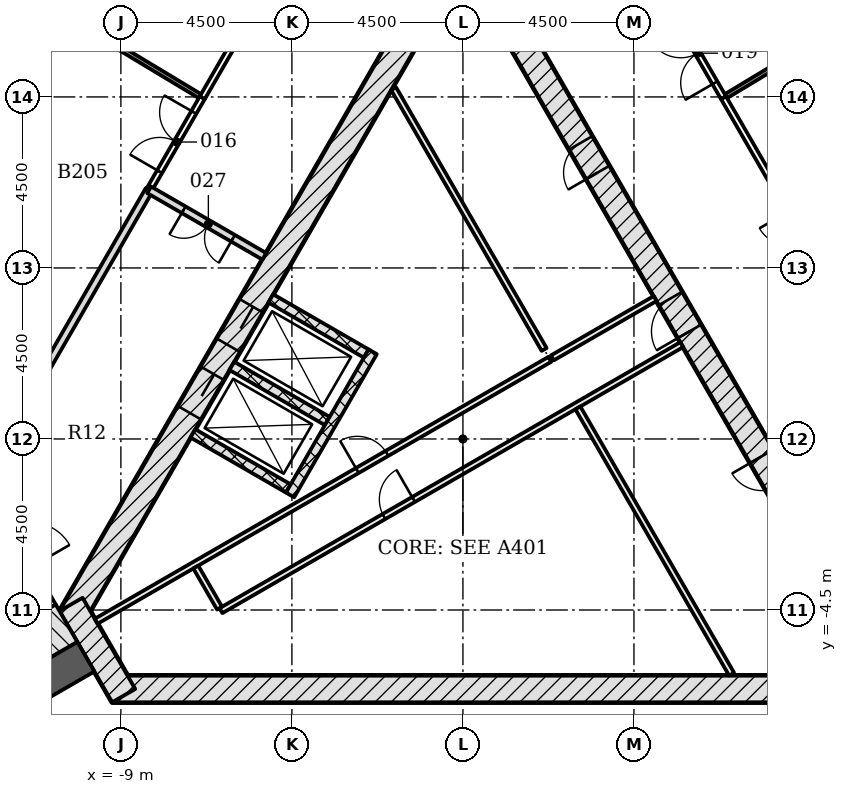
"""IFC4 building model, lengths in metres.
Left out: names, types, materials, properties, quantities, classifications, styles, units other than length and angle.
Written with IfcOpenShell. Run it as: python <this file> out.ifc"""

import sys

from ifc_helpers import new_model, si_unit, direction, frame, frame_2d, origin, place, context, subcontext, project, spatial, rectangle, extrude, element, fill, save


model = new_model("IFC4")
c1 = context("Model", 3, precision=1e-05, world=origin(), true_north=direction((0.0, 1.0)))
c2 = subcontext(c1, "Body", "Model", "MODEL_VIEW")
j1 = project(units=[si_unit("LENGTHUNIT", "METRE"), si_unit("PLANEANGLEUNIT", "RADIAN")], contexts=[c1])
p1 = place(None, origin())
s1 = spatial("IfcSite", under=j1, at=p1, CompositionType="ELEMENT")
p2 = place(p1, origin())
s2 = spatial("IfcBuilding", under=s1, at=p2, CompositionType="ELEMENT")
p3 = place(p2, frame((0.0, 0.0, -9.0)))
s3 = spatial("IfcBuildingStorey", under=s2, at=p3, CompositionType="ELEMENT", Elevation=-9.0)
p4 = place(p3, frame((-9.229, -6.578, -0.3), z_axis=(0.0, 0.0, 1.0), x_axis=(1.0, 0.0, 0.0)))
e1 = element("IfcWall", 1, at=p4, inside=s3, PredefinedType="SHEAR", context=c2, shape_type="SweptSolid", body=[
    extrude(rectangle(XDim=18.458, YDim=0.7, at=frame_2d((9.229, 0.0))), origin(), (0.0, 0.0, 1.0), 4.5),
])
p5 = place(p3, frame((10.311, -4.703, -0.3), z_axis=(0.0, 0.0, 1.0), x_axis=(-0.500001446645, 0.866024568562, 0.0)))
e2 = element("IfcWall", 2, at=p5, inside=s3, PredefinedType="SHEAR", context=c2, shape_type="SweptSolid", body=[
    extrude(rectangle(XDim=18.458, YDim=0.7, at=frame_2d((9.229, 0.0))), origin(), (0.0, 0.0, 1.0), 4.5),
])
p6 = place(p5, frame((8.7, 0.0, 0.3)))
e3 = element("IfcOpeningElement", 3, at=p6, cuts=e2, PredefinedType="OPENING", context=c2, shape_type="SweptSolid", body=[
    extrude(rectangle(XDim=1.0, YDim=2.1, at=frame_2d((0.5, 1.05))), frame((0.0, 0.36, 0.0), z_axis=(0.0, -1.0, 0.0), x_axis=(1.0, 0.0, 0.0)), (0.0, 0.0, 1.0), 0.72),
])
p7 = place(p5, frame((4.002, 0.0, 0.3)))
e4 = element("IfcOpeningElement", 4, at=p7, cuts=e2, PredefinedType="OPENING", context=c2, shape_type="SweptSolid", body=[
    extrude(rectangle(XDim=0.9, YDim=2.1, at=frame_2d((0.45, 1.05))), frame((0.0, 0.36, 0.0), z_axis=(0.0, -1.0, 0.0), x_axis=(1.0, 0.0, 0.0)), (0.0, 0.0, 1.0), 0.72),
])
p8 = place(p5, frame((13.527, 0.0, 0.3)))
e5 = element("IfcOpeningElement", 5, at=p8, cuts=e2, PredefinedType="OPENING", context=c2, shape_type="SweptSolid", body=[
    extrude(rectangle(XDim=0.9, YDim=2.1, at=frame_2d((0.45, 1.05))), frame((0.0, 0.36, 0.0), z_axis=(0.0, -1.0, 0.0), x_axis=(1.0, 0.0, 0.0)), (0.0, 0.0, 1.0), 0.72),
])
p9 = place(p3, frame((-1.083, 11.281, -0.3), z_axis=(0.0, 0.0, 1.0), x_axis=(-0.500001446645, -0.866024568562, 0.0)))
e6 = element("IfcWall", 6, at=p9, inside=s3, PredefinedType="SHEAR", context=c2, shape_type="SweptSolid", body=[
    extrude(rectangle(XDim=18.458, YDim=0.7, at=frame_2d((9.229, 0.0))), origin(), (0.0, 0.0, 1.0), 4.5),
])
p10 = place(p9, frame((8.979, 0.0, 0.3)))
e7 = element("IfcOpeningElement", 7, at=p10, cuts=e6, PredefinedType="OPENING", context=c2, shape_type="SweptSolid", body=[
    extrude(rectangle(XDim=1.2, YDim=2.1, at=frame_2d((0.6, 1.05))), frame((0.0, 0.36, 0.0), z_axis=(0.0, -1.0, 0.0), x_axis=(1.0, 0.0, 0.0)), (0.0, 0.0, 1.0), 0.72),
])
p11 = place(p9, frame((11.029, 0.0, 0.3)))
e8 = element("IfcOpeningElement", 8, at=p11, cuts=e6, PredefinedType="OPENING", context=c2, shape_type="SweptSolid", body=[
    extrude(rectangle(XDim=1.2, YDim=2.1, at=frame_2d((0.6, 1.05))), frame((0.0, 0.36, 0.0), z_axis=(0.0, -1.0, 0.0), x_axis=(1.0, 0.0, 0.0)), (0.0, 0.0, 1.0), 0.72),
])
p12 = place(p3, frame((-10.311, -4.353, -0.3), z_axis=(0.0, 0.0, 1.0), x_axis=(0.500042739161, -0.866000726912, 0.0)))
e9 = element("IfcWall", 9, at=p12, inside=s3, PredefinedType="SHEAR", context=c2, shape_type="SweptSolid", body=[
    extrude(rectangle(XDim=2.771, YDim=0.7, at=frame_2d((1.386, 0.0))), origin(), (0.0, 0.0, 1.0), 4.5),
])
p13 = place(p3, frame((-9.922, -5.728, -0.3), z_axis=(0.0, 0.0, 1.0), x_axis=(-0.866028046028, -0.499995423472, 0.0)))
e10 = element("IfcWall", 10, at=p13, inside=s3, PredefinedType="SHEAR", context=c2, shape_type="SweptSolid", body=[
    extrude(rectangle(XDim=14.633, YDim=0.9, at=frame_2d((7.316, 0.0))), origin(), (0.0, 0.0, 1.0), 4.5),
])
p14 = place(p13, frame((7.35, 0.0, 0.3)))
e11 = element("IfcOpeningElement", 11, at=p14, cuts=e10, PredefinedType="OPENING", context=c2, shape_type="SweptSolid", body=[
    extrude(rectangle(XDim=1.5, YDim=2.1, at=frame_2d((0.75, 1.05))), frame((0.0, 0.46, 0.0), z_axis=(0.0, -1.0, 0.0), x_axis=(1.0, 0.0, 0.0)), (0.0, 0.0, 1.0), 0.92),
])
for number, where, z_axis, x_axis in (
    (12, (-5.056, 3.699, 0.0), (0.0, 0.0, 1.0), (0.866, -0.5, 0.0)),
    (13, (-6.081, 1.923, 0.0), (0.0, 0.0, 1.0), (0.866, -0.5, 0.0)),
    (14, (-7.106, 0.148, 0.0), (0.0, 0.0, 1.0), (0.866, -0.5, 0.0)),
):
    element("IfcWall", number, at=place(p3, frame(where, z_axis=z_axis, x_axis=x_axis)), inside=s3, PredefinedType="PARTITIONING", context=c2, shape_type="SweptSolid", body=[
        extrude(rectangle(XDim=2.9, YDim=0.25, at=frame_2d((1.45, 0.0))), origin(), (0.0, 0.0, 1.0), 4.2),
    ])
p15 = place(p3, frame((-2.374, 2.294, 0.0), z_axis=(0.0, 0.0, 1.0), x_axis=(-0.499996127374, -0.866027639635, 0.0)))
e15 = element("IfcWall", 15, at=p15, inside=s3, PredefinedType="PARTITIONING", context=c2, shape_type="SweptSolid", body=[
    extrude(rectangle(XDim=4.35, YDim=0.25, at=frame_2d((2.175, 0.0))), origin(), (0.0, 0.0, 1.0), 4.2),
])
p16 = place(p3, frame((-9.651, -4.797, 0.0), z_axis=(0.0, 0.0, 1.0), x_axis=(0.866023073213, 0.500004036646, 0.0)))
e16 = element("IfcWall", 16, at=p16, inside=s3, PredefinedType="PARTITIONING", context=c2, shape_type="SweptSolid", body=[
    extrude(rectangle(XDim=13.785, YDim=0.15, at=frame_2d((6.892, 0.0))), origin(), (0.0, 0.0, 1.0), 4.2),
])
p17 = place(p16, frame((7.934, 0.0, 0.0)))
e17 = element("IfcOpeningElement", 17, at=p17, cuts=e16, PredefinedType="OPENING", context=c2, shape_type="SweptSolid", body=[
    extrude(rectangle(XDim=0.9, YDim=2.1, at=frame_2d((0.45, 1.05))), frame((0.0, 0.085, 0.0), z_axis=(0.0, -1.0, 0.0), x_axis=(1.0, 0.0, 0.0)), (0.0, 0.0, 1.0), 0.17),
])
p18 = place(p3, frame((-6.366, -4.517, 0.0), z_axis=(0.0, 0.0, 1.0), x_axis=(0.866023831006, 0.500002724122, 0.0)))
e18 = element("IfcWall", 18, at=p18, inside=s3, PredefinedType="PARTITIONING", context=c2, shape_type="SweptSolid", body=[
    extrude(rectangle(XDim=14.0, YDim=0.15, at=frame_2d((7.0, 0.0))), origin(), (0.0, 0.0, 1.0), 4.2),
])
p19 = place(p18, frame((4.951, 0.0, 0.0)))
e19 = element("IfcOpeningElement", 19, at=p19, cuts=e18, PredefinedType="OPENING", context=c2, shape_type="SweptSolid", body=[
    extrude(rectangle(XDim=0.9, YDim=2.1, at=frame_2d((0.45, 1.05))), frame((0.0, 0.085, 0.0), z_axis=(0.0, -1.0, 0.0), x_axis=(1.0, 0.0, 0.0)), (0.0, 0.0, 1.0), 0.17),
])
p20 = place(p3, frame((-6.404, -4.452, 0.0), z_axis=(0.0, 0.0, 1.0), x_axis=(-0.500004234368, 0.866022959057, 0.0)))
e20 = element("IfcWall", 20, at=p20, inside=s3, PredefinedType="PARTITIONING", context=c2, shape_type="SweptSolid", body=[
    extrude(rectangle(XDim=1.25, YDim=0.15, at=frame_2d((0.625, 0.0))), origin(), (0.0, 0.0, 1.0), 4.2),
])
p21 = place(p3, frame((2.137, 2.355, 0.0), z_axis=(0.0, 0.0, 1.0), x_axis=(-0.500009612796, 0.866019853763, 0.0)))
e21 = element("IfcWall", 21, at=p21, inside=s3, PredefinedType="PARTITIONING", context=c2, shape_type="SweptSolid", body=[
    extrude(rectangle(XDim=7.924, YDim=0.15, at=frame_2d((3.962, 0.0))), origin(), (0.0, 0.0, 1.0), 4.2),
])
p22 = place(p3, frame((2.352, 2.133, 0.0), z_axis=(0.0, 0.0, 1.0), x_axis=(0.866042488821, 0.49997040668, 0.0)))
e22 = element("IfcWall", 22, at=p22, inside=s3, PredefinedType="PARTITIONING", context=c2, shape_type="SweptSolid", body=[
    extrude(rectangle(XDim=3.125, YDim=0.15, at=frame_2d((1.562, 0.0))), origin(), (0.0, 0.0, 1.0), 4.2),
])
p23 = place(p3, frame((7.07, -6.189, 0.0), z_axis=(0.0, 0.0, 1.0), x_axis=(-0.499997568964, 0.866026807339, 0.0)))
e23 = element("IfcWall", 23, at=p23, inside=s3, PredefinedType="PARTITIONING", context=c2, shape_type="SweptSolid", body=[
    extrude(rectangle(XDim=8.091, YDim=0.15, at=frame_2d((4.046, 0.0))), origin(), (0.0, 0.0, 1.0), 4.2),
])
p24 = place(p3, frame((-12.576, -1.331, -0.3), z_axis=(0.0, 0.0, 1.0), x_axis=(0.499970499736, -0.8660424351, 0.0)))
e24 = element("IfcWall", 24, at=p24, inside=s3, PredefinedType="SHEAR", context=c2, shape_type="SweptSolid", body=[
    extrude(rectangle(XDim=3.55, YDim=0.2, at=frame_2d((1.775, 0.0))), origin(), (0.0, 0.0, 1.0), 4.5),
])
p25 = place(p24, frame((1.175, 0.0, 0.3)))
e25 = element("IfcOpeningElement", 25, at=p25, cuts=e24, PredefinedType="OPENING", context=c2, shape_type="SweptSolid", body=[
    extrude(rectangle(XDim=1.2, YDim=2.1, at=frame_2d((0.6, 1.05))), frame((0.0, 0.11, 0.0), z_axis=(0.0, -1.0, 0.0), x_axis=(1.0, 0.0, 0.0)), (0.0, 0.0, 1.0), 0.22),
])
p26 = place(p3, frame((-10.43, -4.847, -0.3), z_axis=(0.0, 0.0, 1.0), x_axis=(-0.866018442252, -0.500012057535, 0.0)))
e26 = element("IfcWall", 26, at=p26, inside=s3, PredefinedType="SHEAR", context=c2, shape_type="SweptSolid", body=[
    extrude(rectangle(XDim=7.2, YDim=1.136, at=frame_2d((3.6, 0.0))), origin(), (0.0, 0.0, 1.0), 4.5),
])
p27 = place(p3, frame((7.44, -10.226, -0.3), z_axis=(0.0, 0.0, 1.0), x_axis=(0.500022077904, 0.866012656725, 0.0)))
e27 = element("IfcWall", 27, at=p27, inside=s3, PredefinedType="SHEAR", context=c2, shape_type="SweptSolid", body=[
    extrude(rectangle(XDim=3.55, YDim=0.2, at=frame_2d((1.775, 0.0))), origin(), (0.0, 0.0, 1.0), 4.5),
])
p28 = place(p27, frame((1.175, 0.0, 0.3)))
e28 = element("IfcOpeningElement", 28, at=p28, cuts=e27, PredefinedType="OPENING", context=c2, shape_type="SweptSolid", body=[
    extrude(rectangle(XDim=1.2, YDim=2.1, at=frame_2d((0.6, 1.05))), frame((0.0, 0.11, 0.0), z_axis=(0.0, -1.0, 0.0), x_axis=(1.0, 0.0, 0.0)), (0.0, 0.0, 1.0), 0.22),
])
p29 = place(p3, frame((-8.256, 6.555, 0.0), z_axis=(0.0, 0.0, 1.0), x_axis=(-0.500042467634, -0.866000883696, 0.0)))
e29 = element("IfcWall", 29, at=p29, inside=s3, PredefinedType="PARTITIONING", context=c2, shape_type="SweptSolid", body=[
    extrude(rectangle(XDim=5.899, YDim=0.2, at=frame_2d((2.95, 0.0))), origin(), (0.0, 0.0, 1.0), 3.588),
])
p30 = place(p3, frame((-5.226, 4.806, 0.0), z_axis=(0.0, 0.0, 1.0), x_axis=(-0.865949687125, 0.500131122175, 0.0)))
e30 = element("IfcWall", 30, at=p30, inside=s3, PredefinedType="PARTITIONING", context=c2, shape_type="SweptSolid", body=[
    extrude(rectangle(XDim=3.499, YDim=0.2, at=frame_2d((1.75, 0.0))), origin(), (0.0, 0.0, 1.0), 4.2),
])
p31 = place(p30, frame((0.95, 0.0, 0.0)))
e31 = element("IfcOpeningElement", 31, at=p31, cuts=e30, PredefinedType="OPENING", context=c2, shape_type="SweptSolid", body=[
    extrude(rectangle(XDim=1.5, YDim=2.1, at=frame_2d((0.75, 1.05))), frame((0.0, 0.11, 0.0), z_axis=(0.0, -1.0, 0.0), x_axis=(1.0, 0.0, 0.0)), (0.0, 0.0, 1.0), 0.22),
])
p32 = place(p3, frame((11.206, 1.446, 0.0), z_axis=(0.0, 0.0, 1.0), x_axis=(-0.499983976786, 0.866034654594, 0.0)))
e32 = element("IfcWall", 32, at=p32, inside=s3, PredefinedType="PARTITIONING", context=c2, shape_type="SweptSolid", body=[
    extrude(rectangle(XDim=8.7, YDim=0.15, at=frame_2d((4.35, 0.0))), origin(), (0.0, 0.0, 1.0), 3.588),
])
p33 = place(p32, frame((3.45, 0.0, 0.0)))
e33 = element("IfcOpeningElement", 33, at=p33, cuts=e32, PredefinedType="OPENING", context=c2, shape_type="SweptSolid", body=[
    extrude(rectangle(XDim=1.8, YDim=2.1, at=frame_2d((0.9, 1.05))), frame((0.0, 0.085, 0.0), z_axis=(0.0, -1.0, 0.0), x_axis=(1.0, 0.0, 0.0)), (0.0, 0.0, 1.0), 0.17),
])
p34 = place(p3, frame((6.855, 8.982, 0.0), z_axis=(0.0, 0.0, 1.0), x_axis=(-0.500176439337, 0.865923512519, 0.0)))
e34 = element("IfcWall", 34, at=p34, inside=s3, PredefinedType="PARTITIONING", context=c2, shape_type="SweptSolid", body=[
    extrude(rectangle(XDim=2.855, YDim=0.15, at=frame_2d((1.427, 0.0))), origin(), (0.0, 0.0, 1.0), 3.588),
])
p35 = place(p34, frame((0.45, 0.0, 0.0)))
e35 = element("IfcOpeningElement", 35, at=p35, cuts=e34, PredefinedType="OPENING", context=c2, shape_type="SweptSolid", body=[
    extrude(rectangle(XDim=1.8, YDim=2.1, at=frame_2d((0.9, 1.05))), frame((0.0, 0.085, 0.0), z_axis=(0.0, -1.0, 0.0), x_axis=(1.0, 0.0, 0.0)), (0.0, 0.0, 1.0), 0.17),
])
p36 = place(p3, frame((-6.857, 8.983, 0.0), z_axis=(0.0, 0.0, 1.0), x_axis=(-0.85673770383, 0.515752369685, 0.0)))
e36 = element("IfcWall", 36, at=p36, inside=s3, PredefinedType="PARTITIONING", context=c2, shape_type="SweptSolid", body=[
    extrude(rectangle(XDim=3.798, YDim=0.12, at=frame_2d((1.899, 0.0))), origin(), (0.0, 0.0, 1.0), 3.588),
])
p37 = place(p3, frame((-8.256, 6.558, 0.0), z_axis=(0.0, 0.0, 1.0), x_axis=(0.500081734942, 0.86597820895, 0.0)))
e37 = element("IfcWall", 37, at=p37, inside=s3, PredefinedType="PARTITIONING", context=c2, shape_type="SweptSolid", body=[
    extrude(rectangle(XDim=2.804, YDim=0.15, at=frame_2d((1.402, 0.0))), origin(), (0.0, 0.0, 1.0), 3.588),
])
p38 = place(p37, frame((0.55, 0.0, 0.0)))
e38 = element("IfcOpeningElement", 38, at=p38, cuts=e37, PredefinedType="OPENING", context=c2, shape_type="SweptSolid", body=[
    extrude(rectangle(XDim=1.8, YDim=2.1, at=frame_2d((0.9, 1.05))), frame((0.0, 0.085, 0.0), z_axis=(0.0, -1.0, 0.0), x_axis=(1.0, 0.0, 0.0)), (0.0, 0.0, 1.0), 0.17),
])
p39 = place(p3, frame((12.736, 12.524, 0.0), z_axis=(0.0, 0.0, 1.0), x_axis=(-0.856559377083, -0.516048479827, 0.0)))
e39 = element("IfcWall", 39, at=p39, inside=s3, PredefinedType="PARTITIONING", context=c2, shape_type="SweptSolid", body=[
    extrude(rectangle(XDim=6.864, YDim=0.12, at=frame_2d((3.432, 0.0))), origin(), (0.0, 0.0, 1.0), 3.588),
])
p40 = place(p3, frame((-6.858, 8.979, 0.0), z_axis=(0.0, 0.0, 1.0), x_axis=(0.500105111742, 0.865964708986, 0.0)))
e40 = element("IfcWall", 40, at=p40, inside=s3, PredefinedType="PARTITIONING", context=c2, shape_type="SweptSolid", body=[
    extrude(rectangle(XDim=4.363, YDim=0.15, at=frame_2d((2.181, 0.0))), origin(), (0.0, 0.0, 1.0), 3.588),
])
p41 = place(p40, frame((1.65, 0.0, 0.0)))
e41 = element("IfcOpeningElement", 41, at=p41, cuts=e40, PredefinedType="OPENING", context=c2, shape_type="SweptSolid", body=[
    extrude(rectangle(XDim=1.0, YDim=2.1, at=frame_2d((0.5, 1.05))), frame((0.0, 0.085, 0.0), z_axis=(0.0, -1.0, 0.0), x_axis=(1.0, 0.0, 0.0)), (0.0, 0.0, 1.0), 0.17),
])
p42 = place(p10, origin())
e42 = element("IfcDoor", 42, at=p42, inside=s3, OperationType="DOUBLE_DOOR_SLIDING", PredefinedType="DOOR", context=c2, shape_type="SweptSolid", body=[
    extrude(rectangle(XDim=1.2, YDim=2.1, at=frame_2d((0.6, 1.05))), frame((0.0, 0.025, 0.0), z_axis=(0.0, -1.0, 0.0), x_axis=(1.0, 0.0, 0.0)), (0.0, 0.0, 1.0), 0.05),
])
fill(e7, e42)
p43 = place(p11, origin())
e43 = element("IfcDoor", 43, at=p43, inside=s3, OperationType="DOUBLE_DOOR_SLIDING", PredefinedType="DOOR", context=c2, shape_type="SweptSolid", body=[
    extrude(rectangle(XDim=1.2, YDim=2.1, at=frame_2d((0.6, 1.05))), frame((0.0, 0.025, 0.0), z_axis=(0.0, -1.0, 0.0), x_axis=(1.0, 0.0, 0.0)), (0.0, 0.0, 1.0), 0.05),
])
fill(e8, e43)
p44 = place(p6, origin())
e44 = element("IfcDoor", 44, at=p44, inside=s3, OperationType="SINGLE_SWING_LEFT", PredefinedType="DOOR", context=c2, shape_type="SweptSolid", body=[
    extrude(rectangle(XDim=1.0, YDim=2.1, at=frame_2d((0.5, 1.05))), frame((0.0, 0.075, 0.0), z_axis=(0.0, -1.0, 0.0), x_axis=(1.0, 0.0, 0.0)), (0.0, 0.0, 1.0), 0.15),
])
fill(e3, e44)
p45 = place(p7, origin())
e45 = element("IfcDoor", 45, at=p45, inside=s3, OperationType="SINGLE_SWING_RIGHT", PredefinedType="DOOR", context=c2, shape_type="SweptSolid", body=[
    extrude(rectangle(XDim=0.9, YDim=2.1, at=frame_2d((0.45, 1.05))), frame((0.0, 0.075, 0.0), z_axis=(0.0, -1.0, 0.0), x_axis=(1.0, 0.0, 0.0)), (0.0, 0.0, 1.0), 0.15),
])
fill(e4, e45)
p46 = place(p8, origin())
e46 = element("IfcDoor", 46, at=p46, inside=s3, OperationType="SINGLE_SWING_LEFT", PredefinedType="DOOR", context=c2, shape_type="SweptSolid", body=[
    extrude(rectangle(XDim=0.9, YDim=2.1, at=frame_2d((0.45, 1.05))), frame((0.0, 0.075, 0.0), z_axis=(0.0, -1.0, 0.0), x_axis=(1.0, 0.0, 0.0)), (0.0, 0.0, 1.0), 0.15),
])
fill(e5, e46)
p47 = place(p19, origin())
e47 = element("IfcDoor", 47, at=p47, inside=s3, OperationType="SINGLE_SWING_RIGHT", PredefinedType="DOOR", context=c2, shape_type="SweptSolid", body=[
    extrude(rectangle(XDim=0.9, YDim=2.1, at=frame_2d((0.45, 1.05))), frame((0.0, 0.025, 0.0), z_axis=(0.0, -1.0, 0.0), x_axis=(1.0, 0.0, 0.0)), (0.0, 0.0, 1.0), 0.05),
])
fill(e19, e47)
p48 = place(p17, origin())
e48 = element("IfcDoor", 48, at=p48, inside=s3, OperationType="SINGLE_SWING_LEFT", PredefinedType="DOOR", context=c2, shape_type="SweptSolid", body=[
    extrude(rectangle(XDim=0.9, YDim=2.1, at=frame_2d((0.45, 1.05))), frame((0.0, 0.025, 0.0), z_axis=(0.0, -1.0, 0.0), x_axis=(1.0, 0.0, 0.0)), (0.0, 0.0, 1.0), 0.05),
])
fill(e17, e48)
p49 = place(p38, origin())
e49 = element("IfcDoor", 49, at=p49, inside=s3, OperationType="DOUBLE_DOOR_SINGLE_SWING", PredefinedType="DOOR", context=c2, shape_type="SweptSolid", body=[
    extrude(rectangle(XDim=1.8, YDim=2.1, at=frame_2d((0.9, 1.05))), frame((0.0, 0.025, 0.0), z_axis=(0.0, -1.0, 0.0), x_axis=(1.0, 0.0, 0.0)), (0.0, 0.0, 1.0), 0.05),
])
fill(e38, e49)
p50 = place(p35, origin())
e50 = element("IfcDoor", 50, at=p50, inside=s3, OperationType="DOUBLE_DOOR_SINGLE_SWING", PredefinedType="DOOR", context=c2, shape_type="SweptSolid", body=[
    extrude(rectangle(XDim=1.8, YDim=2.1, at=frame_2d((0.9, 1.05))), frame((0.0, 0.025, 0.0), z_axis=(0.0, -1.0, 0.0), x_axis=(1.0, 0.0, 0.0)), (0.0, 0.0, 1.0), 0.05),
])
fill(e35, e50)
p51 = place(p31, origin())
e51 = element("IfcDoor", 51, at=p51, inside=s3, OperationType="DOUBLE_DOOR_SINGLE_SWING", PredefinedType="DOOR", context=c2, shape_type="SweptSolid", body=[
    extrude(rectangle(XDim=1.5, YDim=2.1, at=frame_2d((0.75, 1.05))), frame((0.0, 0.025, 0.0), z_axis=(0.0, -1.0, 0.0), x_axis=(1.0, 0.0, 0.0)), (0.0, 0.0, 1.0), 0.05),
])
fill(e31, e51)
save(model, sys.argv[1])
